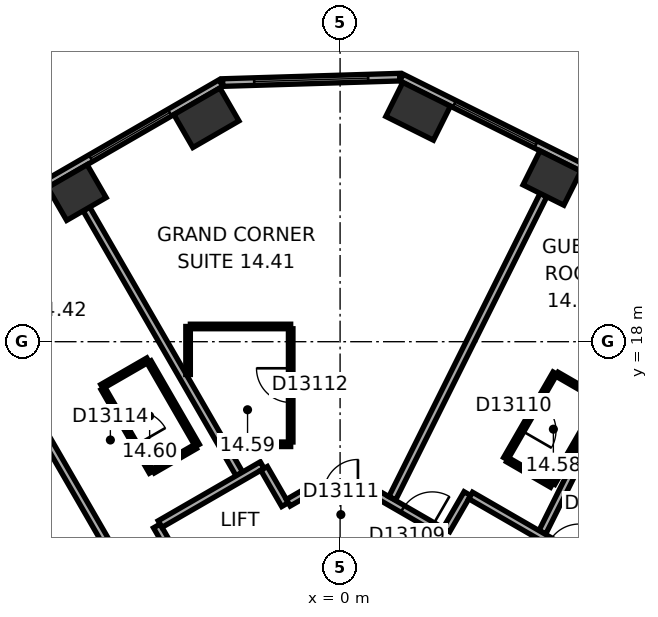
"""IFC4 building model, lengths in metres.
Left out: names, types, materials, properties, quantities, classifications, styles, units other than length and angle.
Written with IfcOpenShell. Run it as: python <this file> out.ifc"""

import sys

from ifc_helpers import new_model, si_unit, direction, frame, frame_2d, origin, origin_2d, place, context, subcontext, project, spatial, rectangle, extrude, element, fill, save


model = new_model("IFC4")
c1 = context("Model", 3, precision=1e-05, world=origin(), true_north=direction((0.0, 1.0)))
c2 = subcontext(c1, "Body", "Model", "MODEL_VIEW")
j1 = project(units=[si_unit("LENGTHUNIT", "METRE"), si_unit("PLANEANGLEUNIT", "RADIAN")], contexts=[c1])
p1 = place(None, origin())
s1 = spatial("IfcSite", under=j1, at=p1, CompositionType="ELEMENT")
p2 = place(p1, origin())
s2 = spatial("IfcBuilding", under=s1, at=p2, CompositionType="ELEMENT")
p3 = place(p2, frame((0.0, 0.0, 67.1)))
s3 = spatial("IfcBuildingStorey", under=s2, at=p3, CompositionType="ELEMENT", Elevation=67.1)
p4 = place(p3, frame((5.574, 22.306, 0.0), z_axis=(0.0, 0.0, 1.0), x_axis=(-0.894934361602, 0.44619781311, 0.0)))
e1 = element("IfcColumn", 1, at=p4, inside=s3, PredefinedType="COLUMN", context=c2, shape_type="SweptSolid", body=[
    extrude(rectangle(XDim=1.2, YDim=1.0, at=origin_2d()), origin(), (0.0, 0.0, 1.0), 3.3),
])
for number, where, z_axis, x_axis in (
    (2, (2.053, 24.062, 0.0), (0.0, 0.0, 1.0), (-0.895, 0.446, 0.0)),
    (3, (-3.518, 23.892, 0.0), (0.0, 0.0, 1.0), (-0.866, -0.5, 0.0)),
):
    element("IfcColumn", number, at=place(p3, frame(where, z_axis=z_axis, x_axis=x_axis)), inside=s3, PredefinedType="COLUMN", context=c2, shape_type="SweptSolid", body=[
        extrude(rectangle(XDim=1.4, YDim=1.0, at=origin_2d()), origin(), (0.0, 0.0, 1.0), 3.3),
    ])
p5 = place(p3, frame((-6.926, 21.925, 0.0), z_axis=(0.0, 0.0, 1.0), x_axis=(-0.866025403784, -0.5, 0.0)))
e4 = element("IfcColumn", 4, at=p5, inside=s3, PredefinedType="COLUMN", context=c2, shape_type="SweptSolid", body=[
    extrude(rectangle(XDim=1.2, YDim=1.0, at=origin_2d()), origin(), (0.0, 0.0, 1.0), 3.3),
])
p6 = place(p3, frame((20.63, 15.47, 0.0), z_axis=(0.0, 0.0, 1.0), x_axis=(-0.894934518609, 0.446197498203, 0.0)))
e5 = element("IfcWall", 5, at=p6, inside=s3, PredefinedType="STANDARD", context=c2, shape_type="SweptSolid", body=[
    extrude(rectangle(XDim=21.246, YDim=0.2, at=frame_2d((10.623, 0.0))), origin(), (0.0, 0.0, 1.0), 3.3),
])
p7 = place(p6, frame((1.553, 0.0, 0.8)))
e6 = element("IfcOpeningElement", 6, at=p7, cuts=e5, PredefinedType="OPENING", context=c2, shape_type="SweptSolid", body=[
    extrude(rectangle(XDim=2.4, YDim=1.7, at=frame_2d((1.2, 0.85))), frame((0.0, 0.11, 0.0), z_axis=(0.0, -1.0, 0.0), x_axis=(1.0, 0.0, 0.0)), (0.0, 0.0, 1.0), 0.22),
])
p8 = place(p6, frame((5.488, 0.0, 0.8)))
e7 = element("IfcOpeningElement", 7, at=p8, cuts=e5, PredefinedType="OPENING", context=c2, shape_type="SweptSolid", body=[
    extrude(rectangle(XDim=2.4, YDim=1.7, at=frame_2d((1.2, 0.85))), frame((0.0, 0.11, 0.0), z_axis=(0.0, -1.0, 0.0), x_axis=(1.0, 0.0, 0.0)), (0.0, 0.0, 1.0), 0.22),
])
p9 = place(p6, frame((9.422, 0.0, 0.8)))
e8 = element("IfcOpeningElement", 8, at=p9, cuts=e5, PredefinedType="OPENING", context=c2, shape_type="SweptSolid", body=[
    extrude(rectangle(XDim=2.4, YDim=1.7, at=frame_2d((1.2, 0.85))), frame((0.0, 0.11, 0.0), z_axis=(0.0, -1.0, 0.0), x_axis=(1.0, 0.0, 0.0)), (0.0, 0.0, 1.0), 0.22),
])
p10 = place(p6, frame((13.357, 0.0, 0.8)))
e9 = element("IfcOpeningElement", 9, at=p10, cuts=e5, PredefinedType="OPENING", context=c2, shape_type="SweptSolid", body=[
    extrude(rectangle(XDim=2.4, YDim=1.7, at=frame_2d((1.2, 0.85))), frame((0.0, 0.11, 0.0), z_axis=(0.0, -1.0, 0.0), x_axis=(1.0, 0.0, 0.0)), (0.0, 0.0, 1.0), 0.22),
])
p11 = place(p6, frame((17.292, 0.0, 0.8)))
e10 = element("IfcOpeningElement", 10, at=p11, cuts=e5, PredefinedType="OPENING", context=c2, shape_type="SweptSolid", body=[
    extrude(rectangle(XDim=2.4, YDim=1.7, at=frame_2d((1.2, 0.85))), frame((0.0, 0.11, 0.0), z_axis=(0.0, -1.0, 0.0), x_axis=(1.0, 0.0, 0.0)), (0.0, 0.0, 1.0), 0.22),
])
p12 = place(p3, frame((1.568, 24.961, 0.0), z_axis=(0.0, 0.0, 1.0), x_axis=(-0.999533359013, -0.030546099927, 0.0)))
e11 = element("IfcWall", 11, at=p12, inside=s3, PredefinedType="STANDARD", context=c2, shape_type="SweptSolid", body=[
    extrude(rectangle(XDim=4.66, YDim=0.2, at=frame_2d((2.33, 0.0))), origin(), (0.0, 0.0, 1.0), 3.3),
])
p13 = place(p12, frame((0.83, 0.0, 0.8)))
e12 = element("IfcOpeningElement", 12, at=p13, cuts=e11, PredefinedType="OPENING", context=c2, shape_type="SweptSolid", body=[
    extrude(rectangle(XDim=3.0, YDim=1.7, at=frame_2d((1.5, 0.85))), frame((0.0, 0.11, 0.0), z_axis=(0.0, -1.0, 0.0), x_axis=(1.0, 0.0, 0.0)), (0.0, 0.0, 1.0), 0.22),
])
p14 = place(p3, frame((-3.136, 24.805, 0.0), z_axis=(0.0, 0.0, 1.0), x_axis=(-0.866028291626, -0.499994998079, 0.0)))
e13 = element("IfcWall", 13, at=p14, inside=s3, PredefinedType="STANDARD", context=c2, shape_type="SweptSolid", body=[
    extrude(rectangle(XDim=21.246, YDim=0.2, at=frame_2d((10.623, 0.0))), origin(), (0.0, 0.0, 1.0), 3.3),
])
p15 = place(p14, frame((1.555, 0.0, 0.8)))
e14 = element("IfcOpeningElement", 14, at=p15, cuts=e13, PredefinedType="OPENING", context=c2, shape_type="SweptSolid", body=[
    extrude(rectangle(XDim=2.4, YDim=1.7, at=frame_2d((1.2, 0.85))), frame((0.0, 0.11, 0.0), z_axis=(0.0, -1.0, 0.0), x_axis=(1.0, 0.0, 0.0)), (0.0, 0.0, 1.0), 0.22),
])
p16 = place(p14, frame((5.489, 0.0, 0.8)))
e15 = element("IfcOpeningElement", 15, at=p16, cuts=e13, PredefinedType="OPENING", context=c2, shape_type="SweptSolid", body=[
    extrude(rectangle(XDim=2.4, YDim=1.7, at=frame_2d((1.2, 0.85))), frame((0.0, 0.11, 0.0), z_axis=(0.0, -1.0, 0.0), x_axis=(1.0, 0.0, 0.0)), (0.0, 0.0, 1.0), 0.22),
])
p17 = place(p14, frame((9.424, 0.0, 0.8)))
e16 = element("IfcOpeningElement", 16, at=p17, cuts=e13, PredefinedType="OPENING", context=c2, shape_type="SweptSolid", body=[
    extrude(rectangle(XDim=2.4, YDim=1.7, at=frame_2d((1.2, 0.85))), frame((0.0, 0.11, 0.0), z_axis=(0.0, -1.0, 0.0), x_axis=(1.0, 0.0, 0.0)), (0.0, 0.0, 1.0), 0.22),
])
p18 = place(p14, frame((13.358, 0.0, 0.8)))
e17 = element("IfcOpeningElement", 17, at=p18, cuts=e13, PredefinedType="OPENING", context=c2, shape_type="SweptSolid", body=[
    extrude(rectangle(XDim=2.4, YDim=1.7, at=frame_2d((1.2, 0.85))), frame((0.0, 0.11, 0.0), z_axis=(0.0, -1.0, 0.0), x_axis=(1.0, 0.0, 0.0)), (0.0, 0.0, 1.0), 0.22),
])
p19 = place(p14, frame((17.293, 0.0, 0.8)))
e18 = element("IfcOpeningElement", 18, at=p19, cuts=e13, PredefinedType="OPENING", context=c2, shape_type="SweptSolid", body=[
    extrude(rectangle(XDim=2.4, YDim=1.7, at=frame_2d((1.2, 0.85))), frame((0.0, 0.11, 0.0), z_axis=(0.0, -1.0, 0.0), x_axis=(1.0, 0.0, 0.0)), (0.0, 0.0, 1.0), 0.22),
])
p20 = place(p3, frame((-10.083, 19.524, 0.0), z_axis=(0.0, 0.0, 1.0), x_axis=(0.499999662836, -0.866025598446, 0.0)))
e19 = element("IfcWall", 19, at=p20, inside=s3, PredefinedType="PARTITIONING", context=c2, shape_type="SweptSolid", body=[
    extrude(rectangle(XDim=9.25, YDim=0.2, at=frame_2d((4.625, 0.0))), origin(), (0.0, 0.0, 1.0), 2.6),
])
p21 = place(p3, frame((-6.676, 21.492, 0.0), z_axis=(0.0, 0.0, 1.0), x_axis=(0.500011263043, -0.866018900966, 0.0)))
e20 = element("IfcWall", 20, at=p21, inside=s3, PredefinedType="PARTITIONING", context=c2, shape_type="SweptSolid", body=[
    extrude(rectangle(XDim=8.049, YDim=0.2, at=frame_2d((4.024, 0.0))), origin(), (0.0, 0.0, 1.0), 3.05),
])
p22 = place(p3, frame((-6.268, 16.82, 0.0), z_axis=(0.0, 0.0, 1.0), x_axis=(0.866002662425, 0.500039387122, 0.0)))
e21 = element("IfcWall", 21, at=p22, inside=s3, PredefinedType="PARTITIONING", context=c2, shape_type="SweptSolid", body=[
    extrude(rectangle(XDim=1.4, YDim=0.12, at=frame_2d((0.7, 0.0))), origin(), (0.0, 0.0, 1.0), 3.05),
])
p23 = place(p3, frame((-5.026, 17.469, 0.0), z_axis=(0.0, 0.0, 1.0), x_axis=(0.500005339912, -0.866022320763, 0.0)))
e22 = element("IfcWall", 22, at=p23, inside=s3, PredefinedType="PARTITIONING", context=c2, shape_type="SweptSolid", body=[
    extrude(rectangle(XDim=2.54, YDim=0.12, at=frame_2d((1.27, 0.0))), origin(), (0.0, 0.0, 1.0), 3.05),
])
p24 = place(p3, frame((-4.968, 14.569, 0.0), z_axis=(0.0, 0.0, 1.0), x_axis=(-0.500046963369, 0.865998287773, 0.0)))
e23 = element("IfcWall", 23, at=p24, inside=s3, PredefinedType="PARTITIONING", context=c2, shape_type="SweptSolid", body=[
    extrude(rectangle(XDim=2.54, YDim=0.12, at=frame_2d((1.27, 0.0))), origin(), (0.0, 0.0, 1.0), 3.05),
])
p25 = place(p24, frame((0.82, 0.0, 0.0)))
e24 = element("IfcOpeningElement", 24, at=p25, cuts=e23, PredefinedType="OPENING", context=c2, shape_type="SweptSolid", body=[
    extrude(rectangle(XDim=0.9, YDim=2.1, at=frame_2d((0.45, 1.05))), frame((0.0, 0.07, 0.0), z_axis=(0.0, -1.0, 0.0), x_axis=(1.0, 0.0, 0.0)), (0.0, 0.0, 1.0), 0.14),
])
p26 = place(p3, frame((-4.823, 13.152, 0.0), z_axis=(0.0, 0.0, 1.0), x_axis=(0.499986357472, -0.866033280158, 0.0)))
e25 = element("IfcWall", 25, at=p26, inside=s3, PredefinedType="PARTITIONING", context=c2, shape_type="SweptSolid", body=[
    extrude(rectangle(XDim=1.201, YDim=0.2, at=frame_2d((0.601, 0.0))), origin(), (0.0, 0.0, 1.0), 3.05),
])
p27 = place(p3, frame((-4.0, 17.137, 0.0), z_axis=(0.0, 0.0, 1.0), x_axis=(0.0, 1.0, 0.0)))
e26 = element("IfcWall", 26, at=p27, inside=s3, PredefinedType="PARTITIONING", context=c2, shape_type="SweptSolid", body=[
    extrude(rectangle(XDim=1.263, YDim=0.12, at=frame_2d((0.632, 0.0))), origin(), (0.0, 0.0, 1.0), 3.05),
])
p28 = place(p3, frame((-3.94, 18.401, 0.0), z_axis=(0.0, 0.0, 1.0), x_axis=(1.0, 0.0, 0.0)))
e27 = element("IfcWall", 27, at=p28, inside=s3, PredefinedType="PARTITIONING", context=c2, shape_type="SweptSolid", body=[
    extrude(rectangle(XDim=2.64, YDim=0.12, at=frame_2d((1.32, 0.0))), origin(), (0.0, 0.0, 1.0), 3.05),
])
p29 = place(p3, frame((-3.808, 15.239, 0.0), z_axis=(0.0, 0.0, 1.0), x_axis=(-0.866087136806, -0.499893060024, 0.0)))
e28 = element("IfcWall", 28, at=p29, inside=s3, PredefinedType="PARTITIONING", context=c2, shape_type="SweptSolid", body=[
    extrude(rectangle(XDim=1.28, YDim=0.12, at=frame_2d((0.64, 0.0))), origin(), (0.0, 0.0, 1.0), 3.05),
])
p30 = place(p3, frame((-2.05, 14.752, 0.0), z_axis=(0.0, 0.0, 1.0), x_axis=(-0.866030936828, -0.499990416364, 0.0)))
e29 = element("IfcWall", 29, at=p30, inside=s3, PredefinedType="PARTITIONING", context=c2, shape_type="SweptSolid", body=[
    extrude(rectangle(XDim=3.102, YDim=0.2, at=frame_2d((1.551, 0.0))), origin(), (0.0, 0.0, 1.0), 3.05),
])
p31 = place(p3, frame((-1.449, 13.712, 0.0), z_axis=(0.0, 0.0, 1.0), x_axis=(-0.499978356969, 0.866037899034, 0.0)))
e30 = element("IfcWall", 30, at=p31, inside=s3, PredefinedType="PARTITIONING", context=c2, shape_type="SweptSolid", body=[
    extrude(rectangle(XDim=1.101, YDim=0.2, at=frame_2d((0.551, 0.0))), origin(), (0.0, 0.0, 1.0), 3.05),
])
p32 = place(p3, frame((-1.3, 15.301, 0.0), z_axis=(0.0, 0.0, 1.0), x_axis=(-1.0, 0.0, 0.0)))
e31 = element("IfcWall", 31, at=p32, inside=s3, PredefinedType="PARTITIONING", context=c2, shape_type="SweptSolid", body=[
    extrude(rectangle(XDim=1.661, YDim=0.12, at=frame_2d((0.831, 0.0))), origin(), (0.0, 0.0, 1.0), 3.05),
])
p33 = place(p3, frame((-1.3, 18.341, 0.0), z_axis=(0.0, 0.0, 1.0), x_axis=(0.0, -1.0, 0.0)))
e32 = element("IfcWall", 32, at=p33, inside=s3, PredefinedType="PARTITIONING", context=c2, shape_type="SweptSolid", body=[
    extrude(rectangle(XDim=2.98, YDim=0.12, at=frame_2d((1.49, 0.0))), origin(), (0.0, 0.0, 1.0), 3.05),
])
p34 = place(p33, frame((1.04, 0.0, 0.0)))
e33 = element("IfcOpeningElement", 33, at=p34, cuts=e32, PredefinedType="OPENING", context=c2, shape_type="SweptSolid", body=[
    extrude(rectangle(XDim=0.9, YDim=2.1, at=frame_2d((0.45, 1.05))), frame((0.0, 0.07, 0.0), z_axis=(0.0, -1.0, 0.0), x_axis=(1.0, 0.0, 0.0)), (0.0, 0.0, 1.0), 0.14),
])
p35 = place(p3, frame((-0.95, 14.001, 0.0), z_axis=(0.0, 0.0, 1.0), x_axis=(-0.86609177584, -0.499885022602, 0.0)))
e34 = element("IfcWall", 34, at=p35, inside=s3, PredefinedType="PARTITIONING", context=c2, shape_type="SweptSolid", body=[
    extrude(rectangle(XDim=0.477, YDim=0.2, at=frame_2d((0.238, 0.0))), origin(), (0.0, 0.0, 1.0), 3.05),
])
p36 = place(p3, frame((0.95, 14.001, 0.0), z_axis=(0.0, 0.0, 1.0), x_axis=(-1.0, 0.0, 0.0)))
e35 = element("IfcWall", 35, at=p36, inside=s3, PredefinedType="PARTITIONING", context=c2, shape_type="SweptSolid", body=[
    extrude(rectangle(XDim=1.86, YDim=0.2, at=frame_2d((0.93, 0.0))), origin(), (0.0, 0.0, 1.0), 3.05),
])
p37 = place(p36, frame((0.48, 0.0, 0.0)))
e36 = element("IfcOpeningElement", 36, at=p37, cuts=e35, PredefinedType="OPENING", context=c2, shape_type="SweptSolid", body=[
    extrude(rectangle(XDim=0.9, YDim=2.1, at=frame_2d((0.45, 1.05))), frame((0.0, 0.11, 0.0), z_axis=(0.0, -1.0, 0.0), x_axis=(1.0, 0.0, 0.0)), (0.0, 0.0, 1.0), 0.22),
])
p38 = place(p3, frame((2.748, 12.962, 0.0), z_axis=(0.0, 0.0, 1.0), x_axis=(-0.866013897511, 0.50001992892, 0.0)))
e37 = element("IfcWall", 37, at=p38, inside=s3, PredefinedType="PARTITIONING", context=c2, shape_type="SweptSolid", body=[
    extrude(rectangle(XDim=2.037, YDim=0.2, at=frame_2d((1.018, 0.0))), origin(), (0.0, 0.0, 1.0), 3.05),
])
p39 = place(p38, frame((0.372, 0.0, 0.0)))
e38 = element("IfcOpeningElement", 38, at=p39, cuts=e37, PredefinedType="OPENING", context=c2, shape_type="SweptSolid", body=[
    extrude(rectangle(XDim=0.9, YDim=2.1, at=frame_2d((0.45, 1.05))), frame((0.0, 0.11, 0.0), z_axis=(0.0, -1.0, 0.0), x_axis=(1.0, 0.0, 0.0)), (0.0, 0.0, 1.0), 0.22),
])
p40 = place(p3, frame((3.349, 14.002, 0.0), z_axis=(0.0, 0.0, 1.0), x_axis=(-0.500074377092, -0.865982457891, 0.0)))
e39 = element("IfcWall", 39, at=p40, inside=s3, PredefinedType="PARTITIONING", context=c2, shape_type="SweptSolid", body=[
    extrude(rectangle(XDim=1.101, YDim=0.2, at=frame_2d((0.55, 0.0))), origin(), (0.0, 0.0, 1.0), 3.05),
])
p41 = place(p3, frame((4.356, 14.922, 0.0), z_axis=(0.0, 0.0, 1.0), x_axis=(0.499936506574, 0.866062058628, 0.0)))
e40 = element("IfcWall", 40, at=p41, inside=s3, PredefinedType="PARTITIONING", context=c2, shape_type="SweptSolid", body=[
    extrude(rectangle(XDim=2.6, YDim=0.12, at=frame_2d((1.3, 0.0))), origin(), (0.0, 0.0, 1.0), 3.05),
])
p42 = place(p41, frame((0.85, 0.0, 0.0)))
e41 = element("IfcOpeningElement", 41, at=p42, cuts=e40, PredefinedType="OPENING", context=c2, shape_type="SweptSolid", body=[
    extrude(rectangle(XDim=0.9, YDim=2.1, at=frame_2d((0.45, 1.05))), frame((0.0, 0.07, 0.0), z_axis=(0.0, -1.0, 0.0), x_axis=(1.0, 0.0, 0.0)), (0.0, 0.0, 1.0), 0.14),
])
p43 = place(p3, frame((5.351, 21.859, 0.0), z_axis=(0.0, 0.0, 1.0), x_axis=(-0.446205309328, -0.894930624086, 0.0)))
e42 = element("IfcWall", 42, at=p43, inside=s3, PredefinedType="PARTITIONING", context=c2, shape_type="SweptSolid", body=[
    extrude(rectangle(XDim=8.913, YDim=0.2, at=frame_2d((4.457, 0.0))), origin(), (0.0, 0.0, 1.0), 2.6),
])
p44 = place(p3, frame((5.569, 14.222, 0.0), z_axis=(0.0, 0.0, 1.0), x_axis=(-0.866036909293, 0.499980071345, 0.0)))
e43 = element("IfcWall", 43, at=p44, inside=s3, PredefinedType="PARTITIONING", context=c2, shape_type="SweptSolid", body=[
    extrude(rectangle(XDim=1.34, YDim=0.12, at=frame_2d((0.67, 0.0))), origin(), (0.0, 0.0, 1.0), 3.05),
])
p45 = place(p3, frame((5.708, 17.144, 0.0), z_axis=(0.0, 0.0, 1.0), x_axis=(0.866082447003, -0.499901185229, 0.0)))
e44 = element("IfcWall", 44, at=p45, inside=s3, PredefinedType="PARTITIONING", context=c2, shape_type="SweptSolid", body=[
    extrude(rectangle(XDim=1.34, YDim=0.12, at=frame_2d((0.67, 0.0))), origin(), (0.0, 0.0, 1.0), 3.05),
])
p46 = place(p3, frame((6.839, 16.422, 0.0), z_axis=(0.0, 0.0, 1.0), x_axis=(-0.50000366821, -0.866023285932, 0.0)))
e45 = element("IfcWall", 45, at=p46, inside=s3, PredefinedType="PARTITIONING", context=c2, shape_type="SweptSolid", body=[
    extrude(rectangle(XDim=2.48, YDim=0.12, at=frame_2d((1.24, 0.0))), origin(), (0.0, 0.0, 1.0), 3.05),
])
p47 = place(p3, frame((8.872, 20.104, 0.0), z_axis=(0.0, 0.0, 1.0), x_axis=(-0.446218378653, -0.894924107706, 0.0)))
e46 = element("IfcWall", 46, at=p47, inside=s3, PredefinedType="PARTITIONING", context=c2, shape_type="SweptSolid", body=[
    extrude(rectangle(XDim=7.95, YDim=0.2, at=frame_2d((3.975, 0.0))), origin(), (0.0, 0.0, 1.0), 3.05),
])
p48 = place(p3, frame((10.885, 9.652, 0.0), z_axis=(0.0, 0.0, 1.0), x_axis=(-0.866033868542, 0.499985338323, 0.0)))
e47 = element("IfcWall", 47, at=p48, inside=s3, PredefinedType="PARTITIONING", context=c2, shape_type="SweptSolid", body=[
    extrude(rectangle(XDim=8.602, YDim=0.2, at=frame_2d((4.301, 0.0))), origin(), (0.0, 0.0, 1.0), 3.05),
])
p49 = place(p48, frame((5.302, 0.0, 0.0)))
e48 = element("IfcOpeningElement", 48, at=p49, cuts=e47, PredefinedType="OPENING", context=c2, shape_type="SweptSolid", body=[
    extrude(rectangle(XDim=0.9, YDim=2.1, at=frame_2d((0.45, 1.05))), frame((0.0, 0.11, 0.0), z_axis=(0.0, -1.0, 0.0), x_axis=(1.0, 0.0, 0.0)), (0.0, 0.0, 1.0), 0.22),
])
p50 = place(p11, origin())
e49 = element("IfcWindow", 49, at=p50, inside=s3, PartitioningType="SINGLE_PANEL", PredefinedType="WINDOW", context=c2, shape_type="SweptSolid", body=[
    extrude(rectangle(XDim=2.4, YDim=1.7, at=frame_2d((1.2, 0.85))), frame((0.0, 0.03, 0.0), z_axis=(0.0, -1.0, 0.0), x_axis=(1.0, 0.0, 0.0)), (0.0, 0.0, 1.0), 0.06),
])
fill(e10, e49)
p51 = place(p13, origin())
e50 = element("IfcWindow", 50, at=p51, inside=s3, PartitioningType="SINGLE_PANEL", PredefinedType="WINDOW", context=c2, shape_type="SweptSolid", body=[
    extrude(rectangle(XDim=3.0, YDim=1.7, at=frame_2d((1.5, 0.85))), frame((0.0, 0.03, 0.0), z_axis=(0.0, -1.0, 0.0), x_axis=(1.0, 0.0, 0.0)), (0.0, 0.0, 1.0), 0.06),
])
fill(e12, e50)
p52 = place(p15, origin())
e51 = element("IfcWindow", 51, at=p52, inside=s3, PartitioningType="SINGLE_PANEL", PredefinedType="WINDOW", context=c2, shape_type="SweptSolid", body=[
    extrude(rectangle(XDim=2.4, YDim=1.7, at=frame_2d((1.2, 0.85))), frame((0.0, 0.03, 0.0), z_axis=(0.0, -1.0, 0.0), x_axis=(1.0, 0.0, 0.0)), (0.0, 0.0, 1.0), 0.06),
])
fill(e14, e51)
p53 = place(p39, origin())
e52 = element("IfcDoor", 52, at=p53, inside=s3, OperationType="SINGLE_SWING_LEFT", PredefinedType="DOOR", context=c2, shape_type="SweptSolid", body=[
    extrude(rectangle(XDim=0.9, YDim=2.1, at=frame_2d((0.45, 1.05))), frame((0.0, 0.025, 0.0), z_axis=(0.0, -1.0, 0.0), x_axis=(1.0, 0.0, 0.0)), (0.0, 0.0, 1.0), 0.05),
])
fill(e38, e52)
p54 = place(p42, origin())
e53 = element("IfcDoor", 53, at=p54, inside=s3, OperationType="SINGLE_SWING_LEFT", PredefinedType="DOOR", context=c2, shape_type="SweptSolid", body=[
    extrude(rectangle(XDim=0.9, YDim=2.1, at=frame_2d((0.45, 1.05))), frame((0.0, 0.025, 0.0), z_axis=(0.0, -1.0, 0.0), x_axis=(1.0, 0.0, 0.0)), (0.0, 0.0, 1.0), 0.05),
])
fill(e41, e53)
p55 = place(p37, origin())
e54 = element("IfcDoor", 54, at=p55, inside=s3, OperationType="SINGLE_SWING_LEFT", PredefinedType="DOOR", context=c2, shape_type="SweptSolid", body=[
    extrude(rectangle(XDim=0.9, YDim=2.1, at=frame_2d((0.45, 1.05))), frame((0.0, 0.025, 0.0), z_axis=(0.0, -1.0, 0.0), x_axis=(1.0, 0.0, 0.0)), (0.0, 0.0, 1.0), 0.05),
])
fill(e36, e54)
p56 = place(p34, origin())
e55 = element("IfcDoor", 55, at=p56, inside=s3, OperationType="SINGLE_SWING_LEFT", PredefinedType="DOOR", context=c2, shape_type="SweptSolid", body=[
    extrude(rectangle(XDim=0.9, YDim=2.1, at=frame_2d((0.45, 1.05))), frame((0.0, 0.025, 0.0), z_axis=(0.0, -1.0, 0.0), x_axis=(1.0, 0.0, 0.0)), (0.0, 0.0, 1.0), 0.05),
])
fill(e33, e55)
p57 = place(p25, origin())
e56 = element("IfcDoor", 56, at=p57, inside=s3, OperationType="SINGLE_SWING_LEFT", PredefinedType="DOOR", context=c2, shape_type="SweptSolid", body=[
    extrude(rectangle(XDim=0.9, YDim=2.1, at=frame_2d((0.45, 1.05))), frame((0.0, 0.025, 0.0), z_axis=(0.0, -1.0, 0.0), x_axis=(1.0, 0.0, 0.0)), (0.0, 0.0, 1.0), 0.05),
])
fill(e24, e56)
save(model, sys.argv[1])
